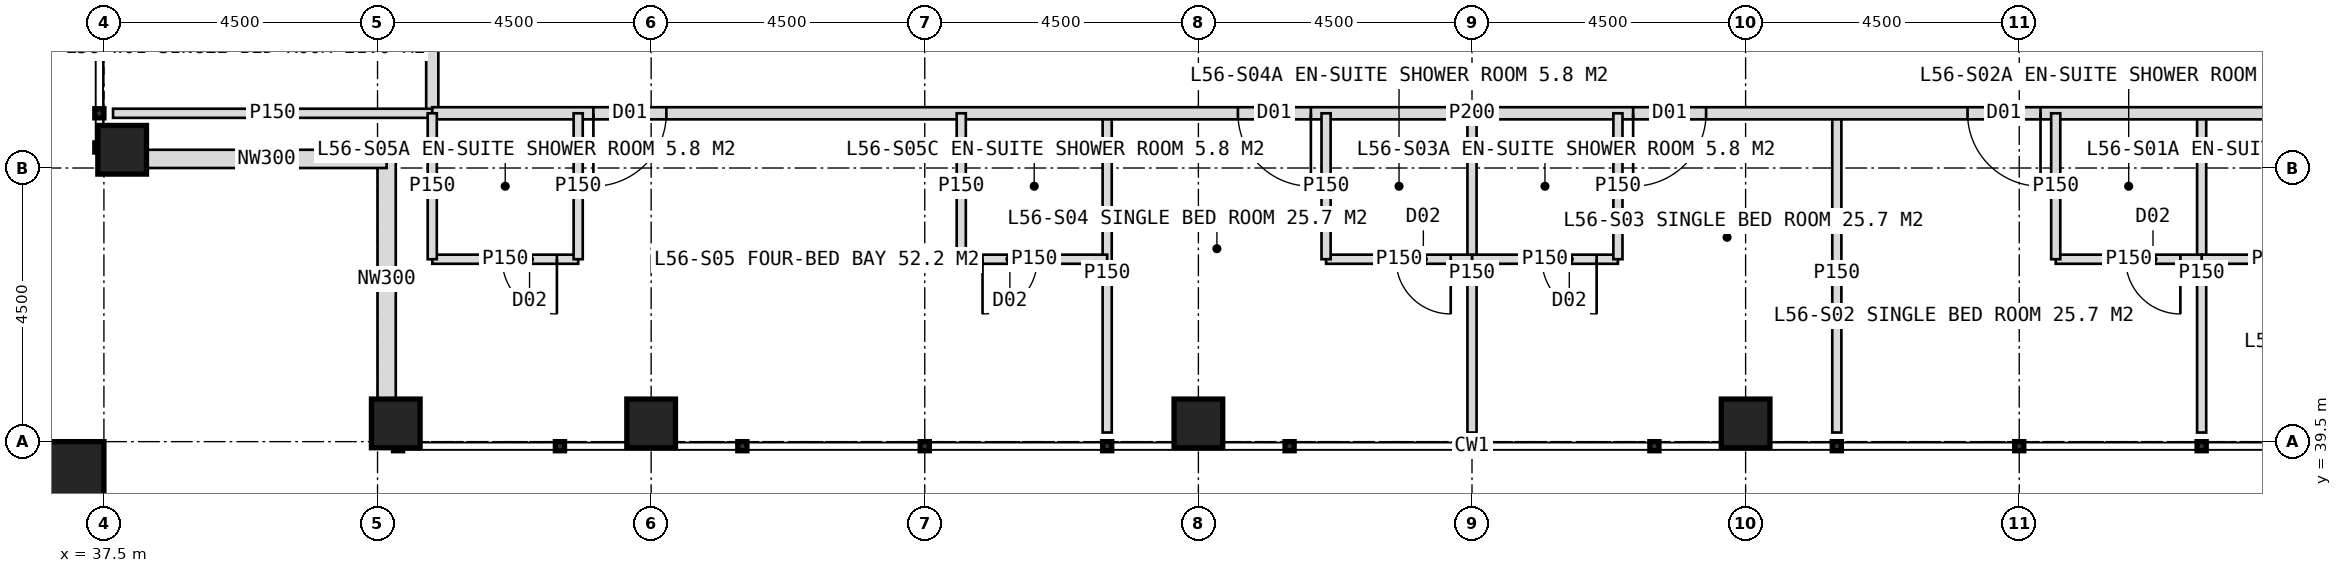
"""IFC4 building model, lengths in metres.
Left out: names, types, materials, properties, quantities, classifications, styles, units other than length and angle.
Written with IfcOpenShell. Run it as: python <this file> out.ifc"""

import sys

from ifc_helpers import new_model, si_unit, direction, frame, frame_2d, origin, origin_2d, place, context, subcontext, project, spatial, rectangle, hollow_rectangle, extrude, element, fill, save


model = new_model("IFC4")
c1 = context("Model", 3, precision=1e-05, world=origin(), true_north=direction((0.0, 1.0)))
c2 = subcontext(c1, "Body", "Model", "MODEL_VIEW")
j1 = project(units=[si_unit("LENGTHUNIT", "METRE"), si_unit("PLANEANGLEUNIT", "RADIAN")], contexts=[c1])
p1 = place(None, origin())
s1 = spatial("IfcSite", under=j1, at=p1, CompositionType="ELEMENT")
p2 = place(p1, origin())
s2 = spatial("IfcBuilding", under=s1, at=p2, CompositionType="ELEMENT")
p3 = place(p2, frame((0.0, 0.0, 233.0)))
s3 = spatial("IfcBuildingStorey", under=s2, at=p3, CompositionType="ELEMENT", Elevation=233.0)
for number, where, z_axis, x_axis in (
    (1, (42.3, 39.8, 0.0), (0.0, 0.0, 1.0), (1.0, 0.0, 0.0)),
    (2, (37.8, 44.3, 0.0), (0.0, 0.0, 1.0), (1.0, 0.0, 0.0)),
    (3, (46.5, 39.8, 0.0), (0.0, 0.0, 1.0), (1.0, 0.0, 0.0)),
    (4, (55.5, 39.8, 0.0), (0.0, 0.0, 1.0), (1.0, 0.0, 0.0)),
    (5, (64.5, 39.8, 0.0), (0.0, 0.0, 1.0), (1.0, 0.0, 0.0)),
):
    element("IfcColumn", number, at=place(p3, frame(where, z_axis=z_axis, x_axis=x_axis)), inside=s3, PredefinedType="COLUMN", context=c2, shape_type="SweptSolid", body=[
        extrude(hollow_rectangle(XDim=0.8, YDim=0.8, WallThickness=0.08, at=origin_2d()), origin(), (0.0, 0.0, 1.0), 4.0),
    ])
p4 = place(p3, frame((36.9, 38.9, 0.0), z_axis=(0.0, 0.0, 1.0), x_axis=(1.0, 0.0, 0.0)))
e6 = element("IfcColumn", 6, at=p4, inside=s3, PredefinedType="COLUMN", context=c2, shape_type="SweptSolid", body=[
    extrude(hollow_rectangle(XDim=1.2, YDim=1.2, WallThickness=0.07, at=origin_2d()), origin(), (0.0, 0.0, 1.0), 4.0),
])
for number, where, z_axis, x_axis in (
    (7, (42.15, 40.2, 0.0), (0.0, 0.0, 1.0), (0.0, 1.0, 0.0)),
    (8, (42.15, 44.15, 0.0), (0.0, 0.0, 1.0), (-1.0, 0.0, 0.0)),
):
    element("IfcWall", number, at=place(p3, frame(where, z_axis=z_axis, x_axis=x_axis)), inside=s3, PredefinedType="ELEMENTEDWALL", context=c2, shape_type="SweptSolid", body=[
        extrude(rectangle(XDim=3.95, YDim=0.3, at=frame_2d((1.975, 0.0))), origin(), (0.0, 0.0, 1.0), 2.85),
    ])
p5 = place(p3, frame((42.9, 44.9, 0.0), z_axis=(0.0, 0.0, 1.0), x_axis=(0.0, 1.0, 0.0)))
e9 = element("IfcWall", 9, at=p5, inside=s3, PredefinedType="PARTITIONING", context=c2, shape_type="SweptSolid", body=[
    extrude(rectangle(XDim=34.2, YDim=0.2, at=frame_2d((17.1, 0.0))), origin(), (0.0, 0.0, 1.0), 3.75),
])
p6 = place(p5, frame((1.25, 0.0, 0.0)))
e10 = element("IfcOpeningElement", 10, at=p6, cuts=e9, PredefinedType="OPENING", context=c2, shape_type="SweptSolid", body=[
    extrude(rectangle(XDim=1.2, YDim=2.2, at=frame_2d((0.6, 1.1))), frame((0.0, 0.11, 0.0), z_axis=(0.0, -1.0, 0.0), x_axis=(1.0, 0.0, 0.0)), (0.0, 0.0, 1.0), 0.22),
])
p7 = place(p5, frame((7.75, 0.0, 0.0)))
e11 = element("IfcOpeningElement", 11, at=p7, cuts=e9, PredefinedType="OPENING", context=c2, shape_type="SweptSolid", body=[
    extrude(rectangle(XDim=1.2, YDim=2.2, at=frame_2d((0.6, 1.1))), frame((0.0, 0.11, 0.0), z_axis=(0.0, -1.0, 0.0), x_axis=(1.0, 0.0, 0.0)), (0.0, 0.0, 1.0), 0.22),
])
p8 = place(p5, frame((13.6, 0.0, 0.0)))
e12 = element("IfcOpeningElement", 12, at=p8, cuts=e9, PredefinedType="OPENING", context=c2, shape_type="SweptSolid", body=[
    extrude(rectangle(XDim=1.0, YDim=2.1, at=frame_2d((0.5, 1.05))), frame((0.0, 0.11, 0.0), z_axis=(0.0, -1.0, 0.0), x_axis=(1.0, 0.0, 0.0)), (0.0, 0.0, 1.0), 0.22),
])
p9 = place(p5, frame((19.75, 0.0, 0.0)))
e13 = element("IfcOpeningElement", 13, at=p9, cuts=e9, PredefinedType="OPENING", context=c2, shape_type="SweptSolid", body=[
    extrude(rectangle(XDim=1.2, YDim=2.2, at=frame_2d((0.6, 1.1))), frame((0.0, 0.11, 0.0), z_axis=(0.0, -1.0, 0.0), x_axis=(1.0, 0.0, 0.0)), (0.0, 0.0, 1.0), 0.22),
])
p10 = place(p5, frame((30.35, 0.0, 0.0)))
e14 = element("IfcOpeningElement", 14, at=p10, cuts=e9, PredefinedType="OPENING", context=c2, shape_type="SweptSolid", body=[
    extrude(rectangle(XDim=1.2, YDim=2.2, at=frame_2d((0.6, 1.1))), frame((0.0, 0.11, 0.0), z_axis=(0.0, -1.0, 0.0), x_axis=(1.0, 0.0, 0.0)), (0.0, 0.0, 1.0), 0.22),
])
for number, where, z_axis, x_axis in (
    (15, (42.9, 44.9, 0.0), (0.0, 0.0, 1.0), (-1.0, 0.0, 0.0)),
    (16, (72.0, 44.9, 0.0), (0.0, 0.0, 1.0), (0.0, -1.0, 0.0)),
    (17, (66.0, 44.9, 0.0), (0.0, 0.0, 1.0), (0.0, -1.0, 0.0)),
):
    element("IfcWall", number, at=place(p3, frame(where, z_axis=z_axis, x_axis=x_axis)), inside=s3, PredefinedType="PARTITIONING", context=c2, shape_type="SweptSolid", body=[
        extrude(rectangle(XDim=5.25, YDim=0.15, at=frame_2d((2.625, 0.0))), origin(), (0.0, 0.0, 1.0), 3.75),
    ])
p11 = place(p3, frame((60.0, 44.9, 0.0), z_axis=(0.0, 0.0, 1.0), x_axis=(0.0, -1.0, 0.0)))
e18 = element("IfcWall", 18, at=p11, inside=s3, PredefinedType="PARTITIONING", context=c2, shape_type="SweptSolid", body=[
    extrude(rectangle(XDim=5.25, YDim=0.15, at=frame_2d((2.625, 0.0))), origin(), (0.0, 0.0, 1.0), 2.95),
])
p12 = place(p3, frame((54.0, 44.9, 0.0), z_axis=(0.0, 0.0, 1.0), x_axis=(0.0, -1.0, 0.0)))
e19 = element("IfcWall", 19, at=p12, inside=s3, PredefinedType="PARTITIONING", context=c2, shape_type="SweptSolid", body=[
    extrude(rectangle(XDim=5.25, YDim=0.15, at=frame_2d((2.625, 0.0))), origin(), (0.0, 0.0, 1.0), 3.75),
])
p13 = place(p3, frame((77.1, 44.9, 0.0), z_axis=(0.0, 0.0, 1.0), x_axis=(-1.0, 0.0, 0.0)))
e20 = element("IfcWall", 20, at=p13, inside=s3, PredefinedType="PARTITIONING", context=c2, shape_type="SweptSolid", body=[
    extrude(rectangle(XDim=34.2, YDim=0.2, at=frame_2d((17.1, 0.0))), origin(), (0.0, 0.0, 1.0), 3.75),
])
p14 = place(p13, frame((1.25, 0.0, 0.0)))
e21 = element("IfcOpeningElement", 21, at=p14, cuts=e20, PredefinedType="OPENING", context=c2, shape_type="SweptSolid", body=[
    extrude(rectangle(XDim=1.2, YDim=2.2, at=frame_2d((0.6, 1.1))), frame((0.0, 0.11, 0.0), z_axis=(0.0, -1.0, 0.0), x_axis=(1.0, 0.0, 0.0)), (0.0, 0.0, 1.0), 0.22),
])
p15 = place(p13, frame((7.75, 0.0, 0.0)))
e22 = element("IfcOpeningElement", 22, at=p15, cuts=e20, PredefinedType="OPENING", context=c2, shape_type="SweptSolid", body=[
    extrude(rectangle(XDim=1.2, YDim=2.2, at=frame_2d((0.6, 1.1))), frame((0.0, 0.11, 0.0), z_axis=(0.0, -1.0, 0.0), x_axis=(1.0, 0.0, 0.0)), (0.0, 0.0, 1.0), 0.22),
])
p16 = place(p13, frame((13.25, 0.0, 0.0)))
e23 = element("IfcOpeningElement", 23, at=p16, cuts=e20, PredefinedType="OPENING", context=c2, shape_type="SweptSolid", body=[
    extrude(rectangle(XDim=1.2, YDim=2.2, at=frame_2d((0.6, 1.1))), frame((0.0, 0.11, 0.0), z_axis=(0.0, -1.0, 0.0), x_axis=(1.0, 0.0, 0.0)), (0.0, 0.0, 1.0), 0.22),
])
p17 = place(p13, frame((19.75, 0.0, 0.0)))
e24 = element("IfcOpeningElement", 24, at=p17, cuts=e20, PredefinedType="OPENING", context=c2, shape_type="SweptSolid", body=[
    extrude(rectangle(XDim=1.2, YDim=2.2, at=frame_2d((0.6, 1.1))), frame((0.0, 0.11, 0.0), z_axis=(0.0, -1.0, 0.0), x_axis=(1.0, 0.0, 0.0)), (0.0, 0.0, 1.0), 0.22),
])
p18 = place(p13, frame((30.35, 0.0, 0.0)))
e25 = element("IfcOpeningElement", 25, at=p18, cuts=e20, PredefinedType="OPENING", context=c2, shape_type="SweptSolid", body=[
    extrude(rectangle(XDim=1.2, YDim=2.2, at=frame_2d((0.6, 1.1))), frame((0.0, 0.11, 0.0), z_axis=(0.0, -1.0, 0.0), x_axis=(1.0, 0.0, 0.0)), (0.0, 0.0, 1.0), 0.22),
])
p19 = place(p3, frame((74.4, 42.5, 0.0), z_axis=(0.0, 0.0, 1.0), x_axis=(-1.0, 0.0, 0.0)))
e26 = element("IfcWall", 26, at=p19, inside=s3, PredefinedType="PARTITIONING", context=c2, shape_type="SweptSolid", body=[
    extrude(rectangle(XDim=2.4, YDim=0.15, at=frame_2d((1.2, 0.0))), origin(), (0.0, 0.0, 1.0), 3.75),
])
p20 = place(p19, frame((0.35, 0.0, 0.0)))
e27 = element("IfcOpeningElement", 27, at=p20, cuts=e26, PredefinedType="OPENING", context=c2, shape_type="SweptSolid", body=[
    extrude(rectangle(XDim=0.9, YDim=2.1, at=frame_2d((0.45, 1.05))), frame((0.0, 0.085, 0.0), z_axis=(0.0, -1.0, 0.0), x_axis=(1.0, 0.0, 0.0)), (0.0, 0.0, 1.0), 0.17),
])
p21 = place(p3, frame((72.0, 42.5, 0.0), z_axis=(0.0, 0.0, 1.0), x_axis=(-1.0, 0.0, 0.0)))
e28 = element("IfcWall", 28, at=p21, inside=s3, PredefinedType="PARTITIONING", context=c2, shape_type="SweptSolid", body=[
    extrude(rectangle(XDim=2.4, YDim=0.15, at=frame_2d((1.2, 0.0))), origin(), (0.0, 0.0, 1.0), 3.75),
])
p22 = place(p21, frame((0.35, 0.0, 0.0)))
e29 = element("IfcOpeningElement", 29, at=p22, cuts=e28, PredefinedType="OPENING", context=c2, shape_type="SweptSolid", body=[
    extrude(rectangle(XDim=0.9, YDim=2.1, at=frame_2d((0.45, 1.05))), frame((0.0, 0.085, 0.0), z_axis=(0.0, -1.0, 0.0), x_axis=(1.0, 0.0, 0.0)), (0.0, 0.0, 1.0), 0.17),
])
p23 = place(p3, frame((69.6, 44.9, 0.0), z_axis=(0.0, 0.0, 1.0), x_axis=(0.0, -1.0, 0.0)))
e30 = element("IfcWall", 30, at=p23, inside=s3, PredefinedType="PARTITIONING", context=c2, shape_type="SweptSolid", body=[
    extrude(rectangle(XDim=2.4, YDim=0.15, at=frame_2d((1.2, 0.0))), origin(), (0.0, 0.0, 1.0), 3.75),
])
p24 = place(p3, frame((62.4, 42.5, 0.0), z_axis=(0.0, 0.0, 1.0), x_axis=(-1.0, 0.0, 0.0)))
e31 = element("IfcWall", 31, at=p24, inside=s3, PredefinedType="PARTITIONING", context=c2, shape_type="SweptSolid", body=[
    extrude(rectangle(XDim=2.4, YDim=0.15, at=frame_2d((1.2, 0.0))), origin(), (0.0, 0.0, 1.0), 3.75),
])
p25 = place(p24, frame((0.35, 0.0, 0.0)))
e32 = element("IfcOpeningElement", 32, at=p25, cuts=e31, PredefinedType="OPENING", context=c2, shape_type="SweptSolid", body=[
    extrude(rectangle(XDim=0.9, YDim=2.1, at=frame_2d((0.45, 1.05))), frame((0.0, 0.085, 0.0), z_axis=(0.0, -1.0, 0.0), x_axis=(1.0, 0.0, 0.0)), (0.0, 0.0, 1.0), 0.17),
])
p26 = place(p3, frame((62.4, 44.9, 0.0), z_axis=(0.0, 0.0, 1.0), x_axis=(0.0, -1.0, 0.0)))
e33 = element("IfcWall", 33, at=p26, inside=s3, PredefinedType="PARTITIONING", context=c2, shape_type="SweptSolid", body=[
    extrude(rectangle(XDim=2.4, YDim=0.15, at=frame_2d((1.2, 0.0))), origin(), (0.0, 0.0, 1.0), 3.75),
])
p27 = place(p3, frame((60.0, 42.5, 0.0), z_axis=(0.0, 0.0, 1.0), x_axis=(-1.0, 0.0, 0.0)))
e34 = element("IfcWall", 34, at=p27, inside=s3, PredefinedType="PARTITIONING", context=c2, shape_type="SweptSolid", body=[
    extrude(rectangle(XDim=2.4, YDim=0.15, at=frame_2d((1.2, 0.0))), origin(), (0.0, 0.0, 1.0), 3.75),
])
p28 = place(p27, frame((0.35, 0.0, 0.0)))
e35 = element("IfcOpeningElement", 35, at=p28, cuts=e34, PredefinedType="OPENING", context=c2, shape_type="SweptSolid", body=[
    extrude(rectangle(XDim=0.9, YDim=2.1, at=frame_2d((0.45, 1.05))), frame((0.0, 0.085, 0.0), z_axis=(0.0, -1.0, 0.0), x_axis=(1.0, 0.0, 0.0)), (0.0, 0.0, 1.0), 0.17),
])
p29 = place(p3, frame((57.6, 44.9, 0.0), z_axis=(0.0, 0.0, 1.0), x_axis=(0.0, -1.0, 0.0)))
e36 = element("IfcWall", 36, at=p29, inside=s3, PredefinedType="PARTITIONING", context=c2, shape_type="SweptSolid", body=[
    extrude(rectangle(XDim=2.4, YDim=0.15, at=frame_2d((1.2, 0.0))), origin(), (0.0, 0.0, 1.0), 3.75),
])
p30 = place(p3, frame((45.3, 42.5, 0.0), z_axis=(0.0, 0.0, 1.0), x_axis=(-1.0, 0.0, 0.0)))
e37 = element("IfcWall", 37, at=p30, inside=s3, PredefinedType="PARTITIONING", context=c2, shape_type="SweptSolid", body=[
    extrude(rectangle(XDim=2.4, YDim=0.15, at=frame_2d((1.2, 0.0))), origin(), (0.0, 0.0, 1.0), 3.75),
])
p31 = place(p30, frame((0.35, 0.0, 0.0)))
e38 = element("IfcOpeningElement", 38, at=p31, cuts=e37, PredefinedType="OPENING", context=c2, shape_type="SweptSolid", body=[
    extrude(rectangle(XDim=0.9, YDim=2.1, at=frame_2d((0.45, 1.05))), frame((0.0, 0.085, 0.0), z_axis=(0.0, -1.0, 0.0), x_axis=(1.0, 0.0, 0.0)), (0.0, 0.0, 1.0), 0.17),
])
p32 = place(p3, frame((45.3, 44.9, 0.0), z_axis=(0.0, 0.0, 1.0), x_axis=(0.0, -1.0, 0.0)))
e39 = element("IfcWall", 39, at=p32, inside=s3, PredefinedType="PARTITIONING", context=c2, shape_type="SweptSolid", body=[
    extrude(rectangle(XDim=2.4, YDim=0.15, at=frame_2d((1.2, 0.0))), origin(), (0.0, 0.0, 1.0), 3.75),
])
p33 = place(p3, frame((54.0, 42.5, 0.0), z_axis=(0.0, 0.0, 1.0), x_axis=(-1.0, 0.0, 0.0)))
e40 = element("IfcWall", 40, at=p33, inside=s3, PredefinedType="PARTITIONING", context=c2, shape_type="SweptSolid", body=[
    extrude(rectangle(XDim=2.4, YDim=0.15, at=frame_2d((1.2, 0.0))), origin(), (0.0, 0.0, 1.0), 3.75),
])
p34 = place(p33, frame((1.15, 0.0, 0.0)))
e41 = element("IfcOpeningElement", 41, at=p34, cuts=e40, PredefinedType="OPENING", context=c2, shape_type="SweptSolid", body=[
    extrude(rectangle(XDim=0.9, YDim=2.1, at=frame_2d((0.45, 1.05))), frame((0.0, 0.085, 0.0), z_axis=(0.0, -1.0, 0.0), x_axis=(1.0, 0.0, 0.0)), (0.0, 0.0, 1.0), 0.17),
])
for number, where, z_axis, x_axis in (
    (42, (51.6, 44.9, 0.0), (0.0, 0.0, 1.0), (0.0, -1.0, 0.0)),
    (43, (42.9, 44.9, 0.0), (0.0, 0.0, 1.0), (0.0, -1.0, 0.0)),
):
    element("IfcWall", number, at=place(p3, frame(where, z_axis=z_axis, x_axis=x_axis)), inside=s3, PredefinedType="PARTITIONING", context=c2, shape_type="SweptSolid", body=[
        extrude(rectangle(XDim=2.4, YDim=0.15, at=frame_2d((1.2, 0.0))), origin(), (0.0, 0.0, 1.0), 3.75),
    ])
p35 = place(p15, origin())
e44 = element("IfcDoor", 44, at=p35, inside=s3, OperationType="SINGLE_SWING_LEFT", PredefinedType="DOOR", context=c2, shape_type="SweptSolid", body=[
    extrude(rectangle(XDim=1.2, YDim=2.2, at=frame_2d((0.6, 1.1))), frame((0.0, 0.025, 0.0), z_axis=(0.0, -1.0, 0.0), x_axis=(1.0, 0.0, 0.0)), (0.0, 0.0, 1.0), 0.05),
])
fill(e22, e44)
p36 = place(p22, origin())
e45 = element("IfcDoor", 45, at=p36, inside=s3, OperationType="SINGLE_SWING_LEFT", PredefinedType="DOOR", context=c2, shape_type="SweptSolid", body=[
    extrude(rectangle(XDim=0.9, YDim=2.1, at=frame_2d((0.45, 1.05))), frame((0.0, 0.025, 0.0), z_axis=(0.0, -1.0, 0.0), x_axis=(1.0, 0.0, 0.0)), (0.0, 0.0, 1.0), 0.05),
])
fill(e29, e45)
p37 = place(p16, origin())
e46 = element("IfcDoor", 46, at=p37, inside=s3, OperationType="SINGLE_SWING_RIGHT", PredefinedType="DOOR", context=c2, shape_type="SweptSolid", body=[
    extrude(rectangle(XDim=1.2, YDim=2.2, at=frame_2d((0.6, 1.1))), frame((0.0, 0.025, 0.0), z_axis=(0.0, -1.0, 0.0), x_axis=(1.0, 0.0, 0.0)), (0.0, 0.0, 1.0), 0.05),
])
fill(e23, e46)
p38 = place(p25, origin())
e47 = element("IfcDoor", 47, at=p38, inside=s3, OperationType="SINGLE_SWING_LEFT", PredefinedType="DOOR", context=c2, shape_type="SweptSolid", body=[
    extrude(rectangle(XDim=0.9, YDim=2.1, at=frame_2d((0.45, 1.05))), frame((0.0, 0.025, 0.0), z_axis=(0.0, -1.0, 0.0), x_axis=(1.0, 0.0, 0.0)), (0.0, 0.0, 1.0), 0.05),
])
fill(e32, e47)
p39 = place(p17, origin())
e48 = element("IfcDoor", 48, at=p39, inside=s3, OperationType="SINGLE_SWING_LEFT", PredefinedType="DOOR", context=c2, shape_type="SweptSolid", body=[
    extrude(rectangle(XDim=1.2, YDim=2.2, at=frame_2d((0.6, 1.1))), frame((0.0, 0.025, 0.0), z_axis=(0.0, -1.0, 0.0), x_axis=(1.0, 0.0, 0.0)), (0.0, 0.0, 1.0), 0.05),
])
fill(e24, e48)
p40 = place(p28, origin())
e49 = element("IfcDoor", 49, at=p40, inside=s3, OperationType="SINGLE_SWING_LEFT", PredefinedType="DOOR", context=c2, shape_type="SweptSolid", body=[
    extrude(rectangle(XDim=0.9, YDim=2.1, at=frame_2d((0.45, 1.05))), frame((0.0, 0.025, 0.0), z_axis=(0.0, -1.0, 0.0), x_axis=(1.0, 0.0, 0.0)), (0.0, 0.0, 1.0), 0.05),
])
fill(e35, e49)
p41 = place(p18, origin())
e50 = element("IfcDoor", 50, at=p41, inside=s3, OperationType="SINGLE_SWING_RIGHT", PredefinedType="DOOR", context=c2, shape_type="SweptSolid", body=[
    extrude(rectangle(XDim=1.2, YDim=2.2, at=frame_2d((0.6, 1.1))), frame((0.0, 0.025, 0.0), z_axis=(0.0, -1.0, 0.0), x_axis=(1.0, 0.0, 0.0)), (0.0, 0.0, 1.0), 0.05),
])
fill(e25, e50)
p42 = place(p31, origin())
e51 = element("IfcDoor", 51, at=p42, inside=s3, OperationType="SINGLE_SWING_LEFT", PredefinedType="DOOR", context=c2, shape_type="SweptSolid", body=[
    extrude(rectangle(XDim=0.9, YDim=2.1, at=frame_2d((0.45, 1.05))), frame((0.0, 0.025, 0.0), z_axis=(0.0, -1.0, 0.0), x_axis=(1.0, 0.0, 0.0)), (0.0, 0.0, 1.0), 0.05),
])
fill(e38, e51)
p43 = place(p34, origin())
e52 = element("IfcDoor", 52, at=p43, inside=s3, OperationType="SINGLE_SWING_RIGHT", PredefinedType="DOOR", context=c2, shape_type="SweptSolid", body=[
    extrude(rectangle(XDim=0.9, YDim=2.1, at=frame_2d((0.45, 1.05))), frame((0.0, 0.025, 0.0), z_axis=(0.0, -1.0, 0.0), x_axis=(1.0, 0.0, 0.0)), (0.0, 0.0, 1.0), 0.05),
])
fill(e41, e52)
save(model, sys.argv[1])
